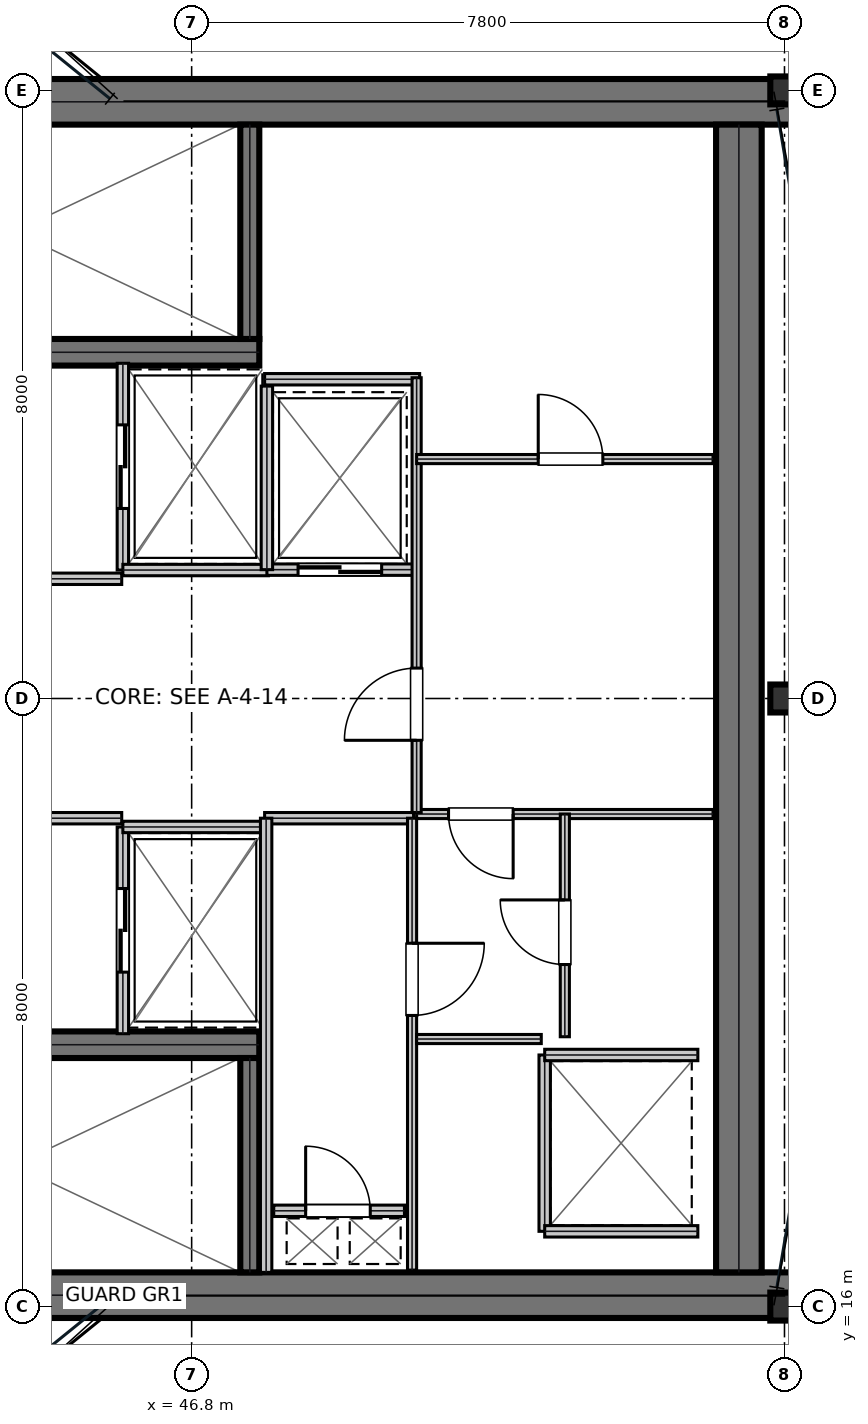
"""IFC4 building model, lengths in metres.
Left out: names, types, materials, properties, quantities, classifications, styles, units other than length and angle.
Written with IfcOpenShell. Run it as: python <this file> out.ifc"""

import sys

from ifc_helpers import new_model, si_unit, direction, frame, frame_2d, origin, origin_2d, place, context, subcontext, project, spatial, rectangle, i_section, extrude, element, fill, save


model = new_model("IFC4")
c1 = context("Model", 3, precision=1e-05, world=origin(), true_north=direction((0.0, 1.0)))
c2 = subcontext(c1, "Body", "Model", "MODEL_VIEW")
j1 = project(units=[si_unit("LENGTHUNIT", "METRE"), si_unit("PLANEANGLEUNIT", "RADIAN")], contexts=[c1])
p1 = place(None, origin())
s1 = spatial("IfcSite", under=j1, at=p1, CompositionType="ELEMENT")
p2 = place(p1, origin())
s2 = spatial("IfcBuilding", under=s1, at=p2, CompositionType="ELEMENT")
p3 = place(p2, frame((0.0, 0.0, 332.4)))
s3 = spatial("IfcBuildingStorey", under=s2, at=p3, CompositionType="ELEMENT", Elevation=332.4)
for number, where, z_axis, x_axis in (
    (1, (38.8, 31.85, 0.0), (0.0, 0.0, 1.0), (1.0, 0.0, 0.0)),
    (2, (38.8, 16.15, 0.0), (0.0, 0.0, 1.0), (1.0, 0.0, 0.0)),
):
    element("IfcWall", number, at=place(p3, frame(where, z_axis=z_axis, x_axis=x_axis)), inside=s3, PredefinedType="SHEAR", context=c2, shape_type="SweptSolid", body=[
        extrude(rectangle(XDim=16.0, YDim=0.6, at=frame_2d((8.0, 0.0))), origin(), (0.0, 0.0, 1.0), 4.18),
    ])
p4 = place(p3, frame((54.0, 16.45, 0.0), z_axis=(0.0, 0.0, 1.0), x_axis=(0.0, 1.0, 0.0)))
e3 = element("IfcWall", 3, at=p4, inside=s3, PredefinedType="SHEAR", context=c2, shape_type="SweptSolid", body=[
    extrude(rectangle(XDim=15.1, YDim=0.6, at=frame_2d((7.55, 0.0))), origin(), (0.0, 0.0, 1.0), 4.18),
])
p5 = place(p3, frame((39.98, 28.555, 0.0), z_axis=(0.0, 0.0, 1.0), x_axis=(1.0, 0.0, 0.0)))
e4 = element("IfcWall", 4, at=p5, inside=s3, PredefinedType="SHEAR", context=c2, shape_type="SweptSolid", body=[
    extrude(rectangle(XDim=7.71, YDim=0.35, at=frame_2d((3.855, 0.0))), origin(), (0.0, 0.0, 1.0), 4.18),
])
p6 = place(p5, frame((0.25, 0.0, 0.0)))
e5 = element("IfcOpeningElement", 5, at=p6, cuts=e4, PredefinedType="OPENING", context=c2, shape_type="SweptSolid", body=[
    extrude(rectangle(XDim=1.1, YDim=2.15, at=frame_2d((0.55, 1.075))), frame((0.0, 0.185, 0.0), z_axis=(0.0, -1.0, 0.0), x_axis=(1.0, 0.0, 0.0)), (0.0, 0.0, 1.0), 0.37),
])
p7 = place(p3, frame((39.98, 19.445, 0.0), z_axis=(0.0, 0.0, 1.0), x_axis=(1.0, 0.0, 0.0)))
e6 = element("IfcWall", 6, at=p7, inside=s3, PredefinedType="SHEAR", context=c2, shape_type="SweptSolid", body=[
    extrude(rectangle(XDim=7.71, YDim=0.35, at=frame_2d((3.855, 0.0))), origin(), (0.0, 0.0, 1.0), 4.18),
])
p8 = place(p7, frame((0.25, 0.0, 0.0)))
e7 = element("IfcOpeningElement", 7, at=p8, cuts=e6, PredefinedType="OPENING", context=c2, shape_type="SweptSolid", body=[
    extrude(rectangle(XDim=1.1, YDim=2.15, at=frame_2d((0.55, 1.075))), frame((0.0, 0.185, 0.0), z_axis=(0.0, -1.0, 0.0), x_axis=(1.0, 0.0, 0.0)), (0.0, 0.0, 1.0), 0.37),
])
for number, where, z_axis, x_axis in (
    (8, (47.565, 28.73, 0.0), (0.0, 0.0, 1.0), (0.0, 1.0, 0.0)),
    (9, (47.565, 16.45, 0.0), (0.0, 0.0, 1.0), (0.0, 1.0, 0.0)),
):
    element("IfcWall", number, at=place(p3, frame(where, z_axis=z_axis, x_axis=x_axis)), inside=s3, PredefinedType="SHEAR", context=c2, shape_type="SweptSolid", body=[
        extrude(rectangle(XDim=2.82, YDim=0.25, at=frame_2d((1.41, 0.0))), origin(), (0.0, 0.0, 1.0), 4.18),
    ])
for number, where, z_axis, x_axis in (
    (10, (54.6, 16.0, 0.0), (0.0, 0.0, 1.0), (1.0, 0.0, 0.0)),
    (11, (54.6, 24.0, 0.0), (0.0, 0.0, 1.0), (1.0, 0.0, 0.0)),
    (12, (54.6, 32.0, 0.0), (0.0, 0.0, 1.0), (1.0, 0.0, 0.0)),
):
    element("IfcColumn", number, at=place(p3, frame(where, z_axis=z_axis, x_axis=x_axis)), inside=s3, PredefinedType="COLUMN", context=c2, shape_type="SweptSolid", body=[
        extrude(i_section(OverallWidth=0.373, OverallDepth=0.368, WebThickness=0.015, FlangeThickness=0.024, at=origin_2d()), origin(), (0.0, 0.0, 1.0), 4.494),
    ])
p9 = place(p3, frame((39.98, 25.575, 0.0), z_axis=(0.0, 0.0, 1.0), x_axis=(1.0, 0.0, 0.0)))
e13 = element("IfcWall", 13, at=p9, inside=s3, PredefinedType="PARTITIONING", context=c2, shape_type="SweptSolid", body=[
    extrude(rectangle(XDim=5.9, YDim=0.15, at=frame_2d((2.95, 0.0))), origin(), (0.0, 0.0, 1.0), 4.18),
])
p10 = place(p9, frame((2.35, 0.0, 0.0)))
e14 = element("IfcOpeningElement", 14, at=p10, cuts=e13, PredefinedType="OPENING", context=c2, shape_type="SweptSolid", body=[
    extrude(rectangle(XDim=1.05, YDim=2.15, at=frame_2d((0.525, 1.075))), frame((0.0, 0.085, 0.0), z_axis=(0.0, -1.0, 0.0), x_axis=(1.0, 0.0, 0.0)), (0.0, 0.0, 1.0), 0.17),
])
p11 = place(p3, frame((39.98, 22.425, 0.0), z_axis=(0.0, 0.0, 1.0), x_axis=(1.0, 0.0, 0.0)))
e15 = element("IfcWall", 15, at=p11, inside=s3, PredefinedType="PARTITIONING", context=c2, shape_type="SweptSolid", body=[
    extrude(rectangle(XDim=5.9, YDim=0.15, at=frame_2d((2.95, 0.0))), origin(), (0.0, 0.0, 1.0), 4.18),
])
p12 = place(p11, frame((2.35, 0.0, 0.0)))
e16 = element("IfcOpeningElement", 16, at=p12, cuts=e15, PredefinedType="OPENING", context=c2, shape_type="SweptSolid", body=[
    extrude(rectangle(XDim=1.05, YDim=2.15, at=frame_2d((0.525, 1.075))), frame((0.0, 0.085, 0.0), z_axis=(0.0, -1.0, 0.0), x_axis=(1.0, 0.0, 0.0)), (0.0, 0.0, 1.0), 0.17),
])
p13 = place(p3, frame((45.895, 25.69, 0.0), z_axis=(0.0, 0.0, 1.0), x_axis=(0.0, 1.0, 0.0)))
e17 = element("IfcWall", 17, at=p13, inside=s3, PredefinedType="PARTITIONING", context=c2, shape_type="SweptSolid", body=[
    extrude(rectangle(XDim=2.72, YDim=0.15, at=frame_2d((1.36, 0.0))), origin(), (0.0, 0.0, 1.0), 4.18),
])
p14 = place(p13, frame((0.81, 0.0, 0.0)))
e18 = element("IfcOpeningElement", 18, at=p14, cuts=e17, PredefinedType="OPENING", context=c2, shape_type="SweptSolid", body=[
    extrude(rectangle(XDim=1.1, YDim=2.15, at=frame_2d((0.55, 1.075))), frame((0.0, 0.085, 0.0), z_axis=(0.0, -1.0, 0.0), x_axis=(1.0, 0.0, 0.0)), (0.0, 0.0, 1.0), 0.17),
])
p15 = place(p3, frame((45.895, 25.69, 0.0), z_axis=(0.0, 0.0, 1.0), x_axis=(1.0, 0.0, 0.0)))
e19 = element("IfcWall", 19, at=p15, inside=s3, PredefinedType="PARTITIONING", context=c2, shape_type="SweptSolid", body=[
    extrude(rectangle(XDim=1.915, YDim=0.15, at=frame_2d((0.958, 0.0))), origin(), (0.0, 0.0, 1.0), 4.18),
])
p16 = place(p3, frame((45.895, 19.59, 0.0), z_axis=(0.0, 0.0, 1.0), x_axis=(0.0, 1.0, 0.0)))
e20 = element("IfcWall", 20, at=p16, inside=s3, PredefinedType="PARTITIONING", context=c2, shape_type="SweptSolid", body=[
    extrude(rectangle(XDim=2.72, YDim=0.15, at=frame_2d((1.36, 0.0))), origin(), (0.0, 0.0, 1.0), 4.18),
])
p17 = place(p16, frame((0.81, 0.0, 0.0)))
e21 = element("IfcOpeningElement", 21, at=p17, cuts=e20, PredefinedType="OPENING", context=c2, shape_type="SweptSolid", body=[
    extrude(rectangle(XDim=1.1, YDim=2.15, at=frame_2d((0.55, 1.075))), frame((0.0, 0.085, 0.0), z_axis=(0.0, -1.0, 0.0), x_axis=(1.0, 0.0, 0.0)), (0.0, 0.0, 1.0), 0.17),
])
p18 = place(p3, frame((45.895, 22.31, 0.0), z_axis=(0.0, 0.0, 1.0), x_axis=(1.0, 0.0, 0.0)))
e22 = element("IfcWall", 22, at=p18, inside=s3, PredefinedType="PARTITIONING", context=c2, shape_type="SweptSolid", body=[
    extrude(rectangle(XDim=1.915, YDim=0.15, at=frame_2d((0.958, 0.0))), origin(), (0.0, 0.0, 1.0), 4.18),
])
p19 = place(p3, frame((47.79, 25.695, 0.0), z_axis=(0.0, 0.0, 1.0), x_axis=(1.0, 0.0, 0.0)))
e23 = element("IfcWall", 23, at=p19, inside=s3, PredefinedType="PARTITIONING", context=c2, shape_type="SweptSolid", body=[
    extrude(rectangle(XDim=1.92, YDim=0.15, at=frame_2d((0.96, 0.0))), origin(), (0.0, 0.0, 1.0), 4.18),
])
p20 = place(p19, frame((0.41, 0.0, 0.0)))
e24 = element("IfcOpeningElement", 24, at=p20, cuts=e23, PredefinedType="OPENING", context=c2, shape_type="SweptSolid", body=[
    extrude(rectangle(XDim=1.1, YDim=2.15, at=frame_2d((0.55, 1.075))), frame((0.0, 0.085, 0.0), z_axis=(0.0, -1.0, 0.0), x_axis=(1.0, 0.0, 0.0)), (0.0, 0.0, 1.0), 0.17),
])
p21 = place(p3, frame((47.79, 25.695, 0.0), z_axis=(0.0, 0.0, 1.0), x_axis=(0.0, 1.0, 0.0)))
e25 = element("IfcWall", 25, at=p21, inside=s3, PredefinedType="PARTITIONING", context=c2, shape_type="SweptSolid", body=[
    extrude(rectangle(XDim=2.415, YDim=0.15, at=frame_2d((1.208, 0.0))), origin(), (0.0, 0.0, 1.0), 4.18),
])
p22 = place(p3, frame((51.445, 16.99, 0.0), z_axis=(0.0, 0.0, 1.0), x_axis=(0.0, 1.0, 0.0)))
e26 = element("IfcWall", 26, at=p22, inside=s3, PredefinedType="PARTITIONING", context=c2, shape_type="SweptSolid", body=[
    extrude(rectangle(XDim=2.32, YDim=0.15, at=frame_2d((1.16, 0.0))), origin(), (0.0, 0.0, 1.0), 4.18),
])
for number, where, z_axis, x_axis in (
    (27, (51.445, 16.99, 0.0), (0.0, 0.0, 1.0), (1.0, 0.0, 0.0)),
    (28, (51.445, 19.31, 0.0), (0.0, 0.0, 1.0), (1.0, 0.0, 0.0)),
):
    element("IfcWall", number, at=place(p3, frame(where, z_axis=z_axis, x_axis=x_axis)), inside=s3, PredefinedType="PARTITIONING", context=c2, shape_type="SweptSolid", body=[
        extrude(rectangle(XDim=2.015, YDim=0.15, at=frame_2d((1.007, 0.0))), origin(), (0.0, 0.0, 1.0), 4.18),
    ])
p23 = place(p3, frame((47.88, 17.26, 0.0), z_axis=(0.0, 0.0, 1.0), x_axis=(1.0, 0.0, 0.0)))
e29 = element("IfcWall", 29, at=p23, inside=s3, PredefinedType="PARTITIONING", context=c2, shape_type="SweptSolid", body=[
    extrude(rectangle(XDim=1.72, YDim=0.15, at=frame_2d((0.86, 0.0))), origin(), (0.0, 0.0, 1.0), 4.18),
])
p24 = place(p23, frame((0.42, 0.0, 0.0)))
e30 = element("IfcOpeningElement", 30, at=p24, cuts=e29, PredefinedType="OPENING", context=c2, shape_type="SweptSolid", body=[
    extrude(rectangle(XDim=0.85, YDim=2.15, at=frame_2d((0.425, 1.075))), frame((0.0, 0.085, 0.0), z_axis=(0.0, -1.0, 0.0), x_axis=(1.0, 0.0, 0.0)), (0.0, 0.0, 1.0), 0.17),
])
p25 = place(p3, frame((47.76, 22.425, 0.0), z_axis=(0.0, 0.0, 1.0), x_axis=(1.0, 0.0, 0.0)))
e31 = element("IfcWall", 31, at=p25, inside=s3, PredefinedType="PARTITIONING", context=c2, shape_type="SweptSolid", body=[
    extrude(rectangle(XDim=1.96, YDim=0.15, at=frame_2d((0.98, 0.0))), origin(), (0.0, 0.0, 1.0), 4.18),
])
p26 = place(p3, frame((47.78, 16.45, 0.0), z_axis=(0.0, 0.0, 1.0), x_axis=(0.0, 1.0, 0.0)))
e32 = element("IfcWall", 32, at=p26, inside=s3, PredefinedType="PARTITIONING", context=c2, shape_type="SweptSolid", body=[
    extrude(rectangle(XDim=5.975, YDim=0.15, at=frame_2d((2.988, 0.0))), origin(), (0.0, 0.0, 1.0), 4.18),
])
p27 = place(p3, frame((49.7, 16.48, 0.0), z_axis=(0.0, 0.0, 1.0), x_axis=(0.0, 1.0, 0.0)))
e33 = element("IfcWall", 33, at=p27, inside=s3, PredefinedType="PARTITIONING", context=c2, shape_type="SweptSolid", body=[
    extrude(rectangle(XDim=5.945, YDim=0.12, at=frame_2d((2.973, 0.0))), origin(), (0.0, 0.0, 1.0), 4.18),
])
p28 = place(p27, frame((3.35, 0.0, 0.0)))
e34 = element("IfcOpeningElement", 34, at=p28, cuts=e33, PredefinedType="OPENING", context=c2, shape_type="SweptSolid", body=[
    extrude(rectangle(XDim=0.95, YDim=2.15, at=frame_2d((0.475, 1.075))), frame((0.0, 0.07, 0.0), z_axis=(0.0, -1.0, 0.0), x_axis=(1.0, 0.0, 0.0)), (0.0, 0.0, 1.0), 0.14),
])
p29 = place(p3, frame((49.76, 22.48, 0.0), z_axis=(0.0, 0.0, 1.0), x_axis=(1.0, 0.0, 0.0)))
e35 = element("IfcWall", 35, at=p29, inside=s3, PredefinedType="PARTITIONING", context=c2, shape_type="SweptSolid", body=[
    extrude(rectangle(XDim=3.9, YDim=0.12, at=frame_2d((1.95, 0.0))), origin(), (0.0, 0.0, 1.0), 4.18),
])
p30 = place(p29, frame((0.42, 0.0, 0.0)))
e36 = element("IfcOpeningElement", 36, at=p30, cuts=e35, PredefinedType="OPENING", context=c2, shape_type="SweptSolid", body=[
    extrude(rectangle(XDim=0.85, YDim=2.15, at=frame_2d((0.425, 1.075))), frame((0.0, 0.07, 0.0), z_axis=(0.0, -1.0, 0.0), x_axis=(1.0, 0.0, 0.0)), (0.0, 0.0, 1.0), 0.14),
])
p31 = place(p3, frame((51.71, 19.55, 0.0), z_axis=(0.0, 0.0, 1.0), x_axis=(0.0, 1.0, 0.0)))
e37 = element("IfcWall", 37, at=p31, inside=s3, PredefinedType="PARTITIONING", context=c2, shape_type="SweptSolid", body=[
    extrude(rectangle(XDim=2.93, YDim=0.12, at=frame_2d((1.465, 0.0))), origin(), (0.0, 0.0, 1.0), 4.18),
])
p32 = place(p31, frame((0.95, 0.0, 0.0)))
e38 = element("IfcOpeningElement", 38, at=p32, cuts=e37, PredefinedType="OPENING", context=c2, shape_type="SweptSolid", body=[
    extrude(rectangle(XDim=0.85, YDim=2.15, at=frame_2d((0.425, 1.075))), frame((0.0, 0.07, 0.0), z_axis=(0.0, -1.0, 0.0), x_axis=(1.0, 0.0, 0.0)), (0.0, 0.0, 1.0), 0.14),
])
p33 = place(p3, frame((49.76, 19.52, 0.0), z_axis=(0.0, 0.0, 1.0), x_axis=(1.0, 0.0, 0.0)))
e39 = element("IfcWall", 39, at=p33, inside=s3, PredefinedType="PARTITIONING", context=c2, shape_type="SweptSolid", body=[
    extrude(rectangle(XDim=1.64, YDim=0.12, at=frame_2d((0.82, 0.0))), origin(), (0.0, 0.0, 1.0), 4.18),
])
p34 = place(p3, frame((47.76, 28.2, 0.0), z_axis=(0.0, 0.0, 1.0), x_axis=(1.0, 0.0, 0.0)))
e40 = element("IfcWall", 40, at=p34, inside=s3, PredefinedType="PARTITIONING", context=c2, shape_type="SweptSolid", body=[
    extrude(rectangle(XDim=2.04, YDim=0.15, at=frame_2d((1.02, 0.0))), origin(), (0.0, 0.0, 1.0), 4.18),
])
p35 = place(p3, frame((49.76, 22.5, 0.0), z_axis=(0.0, 0.0, 1.0), x_axis=(0.0, 1.0, 0.0)))
e41 = element("IfcWall", 41, at=p35, inside=s3, PredefinedType="PARTITIONING", context=c2, shape_type="SweptSolid", body=[
    extrude(rectangle(XDim=5.72, YDim=0.12, at=frame_2d((2.86, 0.0))), origin(), (0.0, 0.0, 1.0), 4.18),
])
p36 = place(p35, frame((0.95, 0.0, 0.0)))
e42 = element("IfcOpeningElement", 42, at=p36, cuts=e41, PredefinedType="OPENING", context=c2, shape_type="SweptSolid", body=[
    extrude(rectangle(XDim=0.95, YDim=2.15, at=frame_2d((0.475, 1.075))), frame((0.0, 0.07, 0.0), z_axis=(0.0, -1.0, 0.0), x_axis=(1.0, 0.0, 0.0)), (0.0, 0.0, 1.0), 0.14),
])
p37 = place(p3, frame((49.76, 27.15, 0.0), z_axis=(0.0, 0.0, 1.0), x_axis=(1.0, 0.0, 0.0)))
e43 = element("IfcWall", 43, at=p37, inside=s3, PredefinedType="PARTITIONING", context=c2, shape_type="SweptSolid", body=[
    extrude(rectangle(XDim=3.9, YDim=0.12, at=frame_2d((1.95, 0.0))), origin(), (0.0, 0.0, 1.0), 4.18),
])
p38 = place(p37, frame((1.6, 0.0, 0.0)))
e44 = element("IfcOpeningElement", 44, at=p38, cuts=e43, PredefinedType="OPENING", context=c2, shape_type="SweptSolid", body=[
    extrude(rectangle(XDim=0.85, YDim=2.15, at=frame_2d((0.425, 1.075))), frame((0.0, 0.07, 0.0), z_axis=(0.0, -1.0, 0.0), x_axis=(1.0, 0.0, 0.0)), (0.0, 0.0, 1.0), 0.14),
])
p39 = place(p14, frame((1.1, 0.0, 0.0), z_axis=(0.0, 0.0, 1.0), x_axis=(-1.0, 0.0, 0.0)))
e45 = element("IfcDoor", 45, at=p39, inside=s3, OperationType="DOUBLE_DOOR_SLIDING", PredefinedType="DOOR", context=c2, shape_type="SweptSolid", body=[
    extrude(rectangle(XDim=1.1, YDim=2.15, at=frame_2d((0.55, 1.075))), frame((0.0, 0.025, 0.0), z_axis=(0.0, -1.0, 0.0), x_axis=(1.0, 0.0, 0.0)), (0.0, 0.0, 1.0), 0.05),
])
fill(e18, e45)
p40 = place(p17, frame((1.1, 0.0, 0.0), z_axis=(0.0, 0.0, 1.0), x_axis=(-1.0, 0.0, 0.0)))
e46 = element("IfcDoor", 46, at=p40, inside=s3, OperationType="DOUBLE_DOOR_SLIDING", PredefinedType="DOOR", context=c2, shape_type="SweptSolid", body=[
    extrude(rectangle(XDim=1.1, YDim=2.15, at=frame_2d((0.55, 1.075))), frame((0.0, 0.025, 0.0), z_axis=(0.0, -1.0, 0.0), x_axis=(1.0, 0.0, 0.0)), (0.0, 0.0, 1.0), 0.05),
])
fill(e21, e46)
p41 = place(p20, frame((1.1, 0.0, 0.0), z_axis=(0.0, 0.0, 1.0), x_axis=(-1.0, 0.0, 0.0)))
e47 = element("IfcDoor", 47, at=p41, inside=s3, OperationType="DOUBLE_DOOR_SLIDING", PredefinedType="DOOR", context=c2, shape_type="SweptSolid", body=[
    extrude(rectangle(XDim=1.1, YDim=2.15, at=frame_2d((0.55, 1.075))), frame((0.0, 0.025, 0.0), z_axis=(0.0, -1.0, 0.0), x_axis=(1.0, 0.0, 0.0)), (0.0, 0.0, 1.0), 0.05),
])
fill(e24, e47)
p42 = place(p24, origin())
e48 = element("IfcDoor", 48, at=p42, inside=s3, OperationType="SINGLE_SWING_LEFT", PredefinedType="TRAPDOOR", context=c2, shape_type="SweptSolid", body=[
    extrude(rectangle(XDim=0.85, YDim=2.15, at=frame_2d((0.425, 1.075))), frame((0.0, 0.025, 0.0), z_axis=(0.0, -1.0, 0.0), x_axis=(1.0, 0.0, 0.0)), (0.0, 0.0, 1.0), 0.05),
])
fill(e30, e48)
p43 = place(p28, frame((0.95, 0.0, 0.0), z_axis=(0.0, 0.0, 1.0), x_axis=(-1.0, 0.0, 0.0)))
e49 = element("IfcDoor", 49, at=p43, inside=s3, OperationType="SINGLE_SWING_LEFT", PredefinedType="DOOR", context=c2, shape_type="SweptSolid", body=[
    extrude(rectangle(XDim=0.95, YDim=2.15, at=frame_2d((0.475, 1.075))), frame((0.0, 0.025, 0.0), z_axis=(0.0, -1.0, 0.0), x_axis=(1.0, 0.0, 0.0)), (0.0, 0.0, 1.0), 0.05),
])
fill(e34, e49)
p44 = place(p30, frame((0.85, 0.0, 0.0), z_axis=(0.0, 0.0, 1.0), x_axis=(-1.0, 0.0, 0.0)))
e50 = element("IfcDoor", 50, at=p44, inside=s3, OperationType="SINGLE_SWING_LEFT", PredefinedType="DOOR", context=c2, shape_type="SweptSolid", body=[
    extrude(rectangle(XDim=0.85, YDim=2.15, at=frame_2d((0.425, 1.075))), frame((0.0, 0.025, 0.0), z_axis=(0.0, -1.0, 0.0), x_axis=(1.0, 0.0, 0.0)), (0.0, 0.0, 1.0), 0.05),
])
fill(e36, e50)
p45 = place(p32, origin())
e51 = element("IfcDoor", 51, at=p45, inside=s3, OperationType="SINGLE_SWING_RIGHT", PredefinedType="DOOR", context=c2, shape_type="SweptSolid", body=[
    extrude(rectangle(XDim=0.85, YDim=2.15, at=frame_2d((0.425, 1.075))), frame((0.0, 0.025, 0.0), z_axis=(0.0, -1.0, 0.0), x_axis=(1.0, 0.0, 0.0)), (0.0, 0.0, 1.0), 0.05),
])
fill(e38, e51)
p46 = place(p36, origin())
e52 = element("IfcDoor", 52, at=p46, inside=s3, OperationType="SINGLE_SWING_LEFT", PredefinedType="DOOR", context=c2, shape_type="SweptSolid", body=[
    extrude(rectangle(XDim=0.95, YDim=2.15, at=frame_2d((0.475, 1.075))), frame((0.0, 0.025, 0.0), z_axis=(0.0, -1.0, 0.0), x_axis=(1.0, 0.0, 0.0)), (0.0, 0.0, 1.0), 0.05),
])
fill(e42, e52)
p47 = place(p38, origin())
e53 = element("IfcDoor", 53, at=p47, inside=s3, OperationType="SINGLE_SWING_LEFT", PredefinedType="DOOR", context=c2, shape_type="SweptSolid", body=[
    extrude(rectangle(XDim=0.85, YDim=2.15, at=frame_2d((0.425, 1.075))), frame((0.0, 0.025, 0.0), z_axis=(0.0, -1.0, 0.0), x_axis=(1.0, 0.0, 0.0)), (0.0, 0.0, 1.0), 0.05),
])
fill(e44, e53)
save(model, sys.argv[1])
